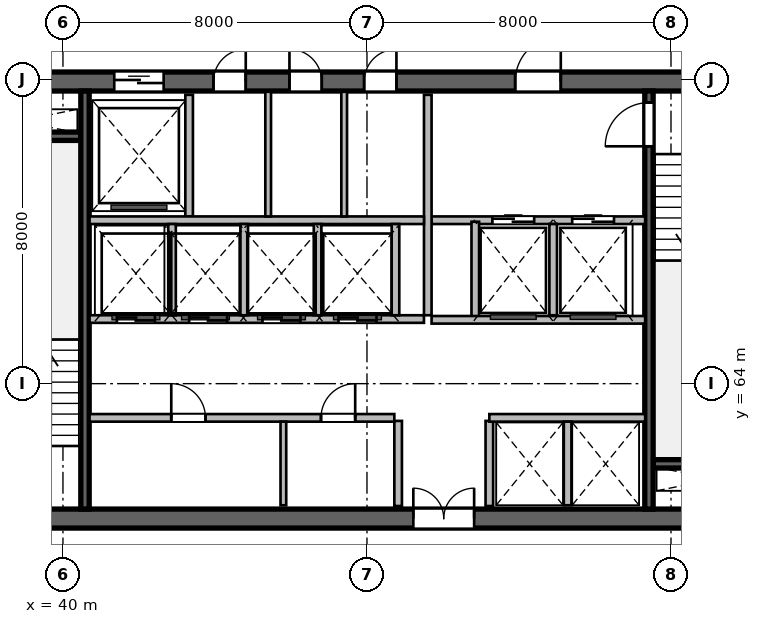
"""IFC4 building model, lengths in metres.
Left out: names, types, materials, properties, quantities, classifications, styles, units other than length and angle.
Written with IfcOpenShell. Run it as: python <this file> out.ifc"""

import sys

from ifc_helpers import new_model, si_unit, direction, frame, frame_2d, origin, place, context, subcontext, project, spatial, rectangle, extrude, source, transform, mapped, element, fill, save


model = new_model("IFC4")
c1 = context("Model", 3, precision=1e-05, world=origin(), true_north=direction((0.0, 1.0)))
c2 = subcontext(c1, "Body", "Model", "MODEL_VIEW")
j1 = project(units=[si_unit("LENGTHUNIT", "METRE"), si_unit("PLANEANGLEUNIT", "RADIAN")], contexts=[c1])
p1 = place(None, origin())
s1 = spatial("IfcSite", under=j1, at=p1, CompositionType="ELEMENT")
p2 = place(p1, origin())
s2 = spatial("IfcBuilding", under=s1, at=p2, CompositionType="ELEMENT")
p3 = place(p2, frame((0.0, 0.0, 174.0)))
s3 = spatial("IfcBuildingStorey", under=s2, at=p3, CompositionType="ELEMENT", Elevation=174.0)
m1 = source(origin(), c2, "Body", "SweptSolid", [
    extrude(rectangle(XDim=21.6, YDim=0.5, at=frame_2d((10.8, 0.0))), origin(), (0.0, 0.0, 1.0), 3.9),
])
p4 = place(p3, frame((37.2, 60.45, 0.0), z_axis=(0.0, 0.0, 1.0), x_axis=(1.0, 0.0, 0.0)))
e1 = element("IfcWall", 1, at=p4, inside=s3, PredefinedType="SHEAR", context=c2, shape_type="MappedRepresentation", body=[
    mapped(m1, transform((0.0, 0.0, 0.0), scale=1.0)),
])
p5 = place(p4, frame((1.1, 0.0, 0.0)))
e2 = element("IfcOpeningElement", 2, at=p5, cuts=e1, PredefinedType="OPENING", context=c2, shape_type="SweptSolid", body=[
    extrude(rectangle(XDim=1.15, YDim=2.15, at=frame_2d((0.575, 1.075))), frame((0.0, 0.26, 0.0), z_axis=(0.0, -1.0, 0.0), x_axis=(1.0, 0.0, 0.0)), (0.0, 0.0, 1.0), 0.52),
])
p6 = place(p4, frame((19.5, 0.0, 0.0)))
e3 = element("IfcOpeningElement", 3, at=p6, cuts=e1, PredefinedType="OPENING", context=c2, shape_type="SweptSolid", body=[
    extrude(rectangle(XDim=0.9, YDim=2.1, at=frame_2d((0.45, 1.05))), frame((0.0, 0.26, 0.0), z_axis=(0.0, -1.0, 0.0), x_axis=(1.0, 0.0, 0.0)), (0.0, 0.0, 1.0), 0.52),
])
p7 = place(p4, frame((12.02, 0.0, 0.0)))
e4 = element("IfcOpeningElement", 4, at=p7, cuts=e1, PredefinedType="OPENING", context=c2, shape_type="SweptSolid", body=[
    extrude(rectangle(XDim=1.6, YDim=2.15, at=frame_2d((0.8, 1.075))), frame((0.0, 0.26, 0.0), z_axis=(0.0, -1.0, 0.0), x_axis=(1.0, 0.0, 0.0)), (0.0, 0.0, 1.0), 0.52),
])
p8 = place(p3, frame((37.2, 71.95, 0.0), z_axis=(0.0, 0.0, 1.0), x_axis=(1.0, 0.0, 0.0)))
e5 = element("IfcWall", 5, at=p8, inside=s3, PredefinedType="SHEAR", context=c2, shape_type="MappedRepresentation", body=[
    mapped(m1, transform((0.0, 0.0, 0.0), scale=1.0)),
])
p9 = place(p8, frame((1.2, 0.0, 0.0)))
e6 = element("IfcOpeningElement", 6, at=p9, cuts=e5, PredefinedType="OPENING", context=c2, shape_type="SweptSolid", body=[
    extrude(rectangle(XDim=0.9, YDim=2.1, at=frame_2d((0.45, 1.05))), frame((0.0, 0.26, 0.0), z_axis=(0.0, -1.0, 0.0), x_axis=(1.0, 0.0, 0.0)), (0.0, 0.0, 1.0), 0.52),
])
p10 = place(p8, frame((14.7, 0.0, 0.0)))
e7 = element("IfcOpeningElement", 7, at=p10, cuts=e5, PredefinedType="OPENING", context=c2, shape_type="SweptSolid", body=[
    extrude(rectangle(XDim=1.2, YDim=2.15, at=frame_2d((0.6, 1.075))), frame((0.0, 0.26, 0.0), z_axis=(0.0, -1.0, 0.0), x_axis=(1.0, 0.0, 0.0)), (0.0, 0.0, 1.0), 0.52),
])
p11 = place(p8, frame((4.15, 0.0, 0.0)))
e8 = element("IfcOpeningElement", 8, at=p11, cuts=e5, PredefinedType="OPENING", context=c2, shape_type="SweptSolid", body=[
    extrude(rectangle(XDim=1.3, YDim=2.15, at=frame_2d((0.65, 1.075))), frame((0.0, 0.26, 0.0), z_axis=(0.0, -1.0, 0.0), x_axis=(1.0, 0.0, 0.0)), (0.0, 0.0, 1.0), 0.52),
])
p12 = place(p8, frame((6.76, 0.0, 0.0)))
e9 = element("IfcOpeningElement", 9, at=p12, cuts=e5, PredefinedType="OPENING", context=c2, shape_type="SweptSolid", body=[
    extrude(rectangle(XDim=0.85, YDim=2.1, at=frame_2d((0.425, 1.05))), frame((0.0, 0.26, 0.0), z_axis=(0.0, -1.0, 0.0), x_axis=(1.0, 0.0, 0.0)), (0.0, 0.0, 1.0), 0.52),
])
p13 = place(p8, frame((8.76, 0.0, 0.0)))
e10 = element("IfcOpeningElement", 10, at=p13, cuts=e5, PredefinedType="OPENING", context=c2, shape_type="SweptSolid", body=[
    extrude(rectangle(XDim=0.85, YDim=2.1, at=frame_2d((0.425, 1.05))), frame((0.0, 0.26, 0.0), z_axis=(0.0, -1.0, 0.0), x_axis=(1.0, 0.0, 0.0)), (0.0, 0.0, 1.0), 0.52),
])
p14 = place(p8, frame((10.725, 0.0, 0.0)))
e11 = element("IfcOpeningElement", 11, at=p14, cuts=e5, PredefinedType="OPENING", context=c2, shape_type="SweptSolid", body=[
    extrude(rectangle(XDim=0.85, YDim=2.1, at=frame_2d((0.425, 1.05))), frame((0.0, 0.26, 0.0), z_axis=(0.0, -1.0, 0.0), x_axis=(1.0, 0.0, 0.0)), (0.0, 0.0, 1.0), 0.52),
])
m2 = source(origin(), c2, "Body", "SweptSolid", [
    extrude(rectangle(XDim=3.27, YDim=0.22, at=frame_2d((1.635, 0.0))), origin(), (0.0, 0.0, 1.0), 3.9),
])
for number, where, z_axis, x_axis in (
    (12, (37.2, 70.51, 0.0), (0.0, 0.0, 1.0), (1.0, 0.0, 0.0)),
    (13, (55.53, 61.89, 0.0), (0.0, 0.0, 1.0), (1.0, 0.0, 0.0)),
):
    element("IfcWall", number, at=place(p3, frame(where, z_axis=z_axis, x_axis=x_axis)), inside=s3, PredefinedType="SHEAR", context=c2, shape_type="MappedRepresentation", body=[
        mapped(m2, transform((0.0, 0.0, 0.0), scale=1.0)),
    ])
m3 = source(origin(), c2, "Body", "SweptSolid", [
    extrude(rectangle(XDim=11.0, YDim=0.22, at=frame_2d((5.5, 0.0))), origin(), (0.0, 0.0, 1.0), 3.9),
])
p15 = place(p3, frame((40.58, 60.7, 0.0), z_axis=(0.0, 0.0, 1.0), x_axis=(0.0, 1.0, 0.0)))
e14 = element("IfcWall", 14, at=p15, inside=s3, PredefinedType="SHEAR", context=c2, shape_type="MappedRepresentation", body=[
    mapped(m3, transform((0.0, 0.0, 0.0), scale=1.0)),
])
p16 = place(p3, frame((55.42, 60.7, 0.0), z_axis=(0.0, 0.0, 1.0), x_axis=(0.0, 1.0, 0.0)))
e15 = element("IfcWall", 15, at=p16, inside=s3, PredefinedType="SHEAR", context=c2, shape_type="MappedRepresentation", body=[
    mapped(m3, transform((0.0, 0.0, 0.0), scale=1.0)),
])
p17 = place(p16, frame((9.545, 0.0, 0.0)))
e16 = element("IfcOpeningElement", 16, at=p17, cuts=e15, PredefinedType="OPENING", context=c2, shape_type="SweptSolid", body=[
    extrude(rectangle(XDim=1.15, YDim=2.15, at=frame_2d((0.575, 1.075))), frame((0.0, 0.12, 0.0), z_axis=(0.0, -1.0, 0.0), x_axis=(1.0, 0.0, 0.0)), (0.0, 0.0, 1.0), 0.24),
])
m4 = source(origin(), c2, "Body", "SweptSolid", [
    extrude(rectangle(XDim=2.24, YDim=0.2, at=frame_2d((1.12, 0.0))), origin(), (0.0, 0.0, 1.0), 3.65),
])
for number, where, z_axis, x_axis in (
    (17, (48.82, 60.78, 0.0), (0.0, 0.0, 1.0), (0.0, 1.0, 0.0)),
    (18, (51.22, 60.78, 0.0), (0.0, 0.0, 1.0), (0.0, 1.0, 0.0)),
):
    element("IfcWall", number, at=place(p3, frame(where, z_axis=z_axis, x_axis=x_axis)), inside=s3, PredefinedType="SOLIDWALL", context=c2, shape_type="MappedRepresentation", body=[
        mapped(m4, transform((0.0, 0.0, 0.0), scale=1.0)),
    ])
m5 = source(origin(), c2, "Body", "SweptSolid", [
    extrude(rectangle(XDim=5.62, YDim=0.2, at=frame_2d((2.81, 0.0))), origin(), (0.0, 0.0, 1.0), 3.65),
])
p18 = place(p3, frame((49.7, 68.3, 0.0), z_axis=(0.0, 0.0, 1.0), x_axis=(1.0, 0.0, 0.0)))
e19 = element("IfcWall", 19, at=p18, inside=s3, PredefinedType="SOLIDWALL", context=c2, shape_type="MappedRepresentation", body=[
    mapped(m5, transform((0.0, 0.0, 0.0), scale=1.0)),
])
p19 = place(p18, frame((1.6, 0.0, 0.0)))
e20 = element("IfcOpeningElement", 20, at=p19, cuts=e19, PredefinedType="OPENING", context=c2, shape_type="SweptSolid", body=[
    extrude(rectangle(XDim=1.1, YDim=2.15, at=frame_2d((0.55, 1.075))), frame((0.0, 0.11, 0.0), z_axis=(0.0, -1.0, 0.0), x_axis=(1.0, 0.0, 0.0)), (0.0, 0.0, 1.0), 0.22),
])
p20 = place(p18, frame((3.7, 0.0, 0.0)))
e21 = element("IfcOpeningElement", 21, at=p20, cuts=e19, PredefinedType="OPENING", context=c2, shape_type="SweptSolid", body=[
    extrude(rectangle(XDim=1.1, YDim=2.15, at=frame_2d((0.55, 1.075))), frame((0.0, 0.11, 0.0), z_axis=(0.0, -1.0, 0.0), x_axis=(1.0, 0.0, 0.0)), (0.0, 0.0, 1.0), 0.22),
])
m6 = source(origin(), c2, "Body", "SweptSolid", [
    extrude(rectangle(XDim=5.8, YDim=0.2, at=frame_2d((2.9, 0.0))), origin(), (0.0, 0.0, 1.0), 3.65),
])
p21 = place(p3, frame((49.6, 65.8, 0.0), z_axis=(0.0, 0.0, 1.0), x_axis=(0.0, 1.0, 0.0)))
e22 = element("IfcWall", 22, at=p21, inside=s3, PredefinedType="SOLIDWALL", context=c2, shape_type="MappedRepresentation", body=[
    mapped(m6, transform((0.0, 0.0, 0.0), scale=1.0)),
])
m7 = source(origin(), c2, "Body", "SweptSolid", [
    extrude(rectangle(XDim=2.58, YDim=0.2, at=frame_2d((1.29, 0.0))), origin(), (0.0, 0.0, 1.0), 3.65),
])
p22 = place(p3, frame((50.85, 65.68, 0.0), z_axis=(0.0, 0.0, 1.0), x_axis=(0.0, 1.0, 0.0)))
e23 = element("IfcWall", 23, at=p22, inside=s3, PredefinedType="SOLIDWALL", context=c2, shape_type="MappedRepresentation", body=[
    mapped(m7, transform((0.0, 0.0, 0.0), scale=1.0)),
])
m8 = source(origin(), c2, "Body", "SweptSolid", [
    extrude(rectangle(XDim=2.4, YDim=0.2, at=frame_2d((1.2, 0.0))), origin(), (0.0, 0.0, 1.0), 3.65),
])
p23 = place(p3, frame((52.9, 65.8, 0.0), z_axis=(0.0, 0.0, 1.0), x_axis=(0.0, 1.0, 0.0)))
e24 = element("IfcWall", 24, at=p23, inside=s3, PredefinedType="SOLIDWALL", context=c2, shape_type="MappedRepresentation", body=[
    mapped(m8, transform((0.0, 0.0, 0.0), scale=1.0)),
])
p24 = place(p3, frame((49.7, 65.68, 0.0), z_axis=(0.0, 0.0, 1.0), x_axis=(1.0, 0.0, 0.0)))
e25 = element("IfcWall", 25, at=p24, inside=s3, PredefinedType="SOLIDWALL", context=c2, shape_type="MappedRepresentation", body=[
    mapped(m5, transform((0.0, 0.0, 0.0), scale=1.0)),
])
m9 = source(origin(), c2, "Body", "SweptSolid", [
    extrude(rectangle(XDim=3.2, YDim=0.2, at=frame_2d((1.6, 0.0))), origin(), (0.0, 0.0, 1.0), 3.65),
])
p25 = place(p3, frame((43.32, 68.4, 0.0), z_axis=(0.0, 0.0, 1.0), x_axis=(0.0, 1.0, 0.0)))
e26 = element("IfcWall", 26, at=p25, inside=s3, PredefinedType="SOLIDWALL", context=c2, shape_type="MappedRepresentation", body=[
    mapped(m9, transform((0.0, 0.0, 0.0), scale=1.0)),
])
m10 = source(origin(), c2, "Body", "SweptSolid", [
    extrude(rectangle(XDim=8.8, YDim=0.2, at=frame_2d((4.4, 0.0))), origin(), (0.0, 0.0, 1.0), 3.65),
])
p26 = place(p3, frame((40.7, 68.3, 0.0), z_axis=(0.0, 0.0, 1.0), x_axis=(1.0, 0.0, 0.0)))
e27 = element("IfcWall", 27, at=p26, inside=s3, PredefinedType="SOLIDWALL", context=c2, shape_type="MappedRepresentation", body=[
    mapped(m10, transform((0.0, 0.0, 0.0), scale=1.0)),
])
m11 = source(origin(), c2, "Body", "SweptSolid", [
    extrude(rectangle(XDim=3.28, YDim=0.15, at=frame_2d((1.64, 0.0))), origin(), (0.0, 0.0, 1.0), 3.65),
])
for number, where, z_axis, x_axis in (
    (28, (45.4, 68.4, 0.0), (0.0, 0.0, 1.0), (0.0, 1.0, 0.0)),
    (29, (47.4, 68.4, 0.0), (0.0, 0.0, 1.0), (0.0, 1.0, 0.0)),
):
    element("IfcWall", number, at=place(p3, frame(where, z_axis=z_axis, x_axis=x_axis)), inside=s3, PredefinedType="PARTITIONING", context=c2, shape_type="MappedRepresentation", body=[
        mapped(m11, transform((0.0, 0.0, 0.0), scale=1.0)),
    ])
m12 = source(origin(), c2, "Body", "SweptSolid", [
    extrude(rectangle(XDim=8.02, YDim=0.2, at=frame_2d((4.01, 0.0))), origin(), (0.0, 0.0, 1.0), 3.65),
])
p27 = place(p3, frame((40.7, 63.1, 0.0), z_axis=(0.0, 0.0, 1.0), x_axis=(1.0, 0.0, 0.0)))
e30 = element("IfcWall", 30, at=p27, inside=s3, PredefinedType="SOLIDWALL", context=c2, shape_type="MappedRepresentation", body=[
    mapped(m12, transform((0.0, 0.0, 0.0), scale=1.0)),
])
p28 = place(p27, frame((2.15, 0.0, 0.0)))
e31 = element("IfcOpeningElement", 31, at=p28, cuts=e30, PredefinedType="OPENING", context=c2, shape_type="SweptSolid", body=[
    extrude(rectangle(XDim=0.9, YDim=2.1, at=frame_2d((0.45, 1.05))), frame((0.0, 0.11, 0.0), z_axis=(0.0, -1.0, 0.0), x_axis=(1.0, 0.0, 0.0)), (0.0, 0.0, 1.0), 0.22),
])
p29 = place(p27, frame((6.09, 0.0, 0.0)))
e32 = element("IfcOpeningElement", 32, at=p29, cuts=e30, PredefinedType="OPENING", context=c2, shape_type="SweptSolid", body=[
    extrude(rectangle(XDim=0.9, YDim=2.1, at=frame_2d((0.45, 1.05))), frame((0.0, 0.11, 0.0), z_axis=(0.0, -1.0, 0.0), x_axis=(1.0, 0.0, 0.0)), (0.0, 0.0, 1.0), 0.22),
])
m13 = source(origin(), c2, "Body", "SweptSolid", [
    extrude(rectangle(XDim=4.1, YDim=0.2, at=frame_2d((2.05, 0.0))), origin(), (0.0, 0.0, 1.0), 3.65),
])
p30 = place(p3, frame((51.22, 63.1, 0.0), z_axis=(0.0, 0.0, 1.0), x_axis=(1.0, 0.0, 0.0)))
e33 = element("IfcWall", 33, at=p30, inside=s3, PredefinedType="SOLIDWALL", context=c2, shape_type="MappedRepresentation", body=[
    mapped(m13, transform((0.0, 0.0, 0.0), scale=1.0)),
])
m14 = source(origin(), c2, "Body", "SweptSolid", [
    extrude(rectangle(XDim=2.2, YDim=0.15, at=frame_2d((1.1, 0.0))), origin(), (0.0, 0.0, 1.0), 3.65),
])
p31 = place(p3, frame((45.8, 60.8, 0.0), z_axis=(0.0, 0.0, 1.0), x_axis=(0.0, 1.0, 0.0)))
e34 = element("IfcWall", 34, at=p31, inside=s3, PredefinedType="PARTITIONING", context=c2, shape_type="MappedRepresentation", body=[
    mapped(m14, transform((0.0, 0.0, 0.0), scale=1.0)),
])
m15 = source(origin(), c2, "Body", "SweptSolid", [
    extrude(rectangle(XDim=2.2, YDim=0.2, at=frame_2d((1.1, 0.0))), origin(), (0.0, 0.0, 1.0), 3.65),
])
p32 = place(p3, frame((53.28, 60.8, 0.0), z_axis=(0.0, 0.0, 1.0), x_axis=(0.0, 1.0, 0.0)))
e35 = element("IfcWall", 35, at=p32, inside=s3, PredefinedType="SOLIDWALL", context=c2, shape_type="MappedRepresentation", body=[
    mapped(m15, transform((0.0, 0.0, 0.0), scale=1.0)),
])
p33 = place(p3, frame((40.7, 65.7, 0.0), z_axis=(0.0, 0.0, 1.0), x_axis=(1.0, 0.0, 0.0)))
e36 = element("IfcWall", 36, at=p33, inside=s3, PredefinedType="SOLIDWALL", context=c2, shape_type="MappedRepresentation", body=[
    mapped(m10, transform((0.0, 0.0, 0.0), scale=1.0)),
])
p34 = place(p33, frame((0.72, 0.0, 0.0)))
e37 = element("IfcOpeningElement", 37, at=p34, cuts=e36, PredefinedType="OPENING", context=c2, shape_type="SweptSolid", body=[
    extrude(rectangle(XDim=1.0, YDim=2.15, at=frame_2d((0.5, 1.075))), frame((0.0, 0.11, 0.0), z_axis=(0.0, -1.0, 0.0), x_axis=(1.0, 0.0, 0.0)), (0.0, 0.0, 1.0), 0.22),
])
p35 = place(p33, frame((2.62, 0.0, 0.0)))
e38 = element("IfcOpeningElement", 38, at=p35, cuts=e36, PredefinedType="OPENING", context=c2, shape_type="SweptSolid", body=[
    extrude(rectangle(XDim=1.0, YDim=2.15, at=frame_2d((0.5, 1.075))), frame((0.0, 0.11, 0.0), z_axis=(0.0, -1.0, 0.0), x_axis=(1.0, 0.0, 0.0)), (0.0, 0.0, 1.0), 0.22),
])
p36 = place(p33, frame((4.55, 0.0, 0.0)))
e39 = element("IfcOpeningElement", 39, at=p36, cuts=e36, PredefinedType="OPENING", context=c2, shape_type="SweptSolid", body=[
    extrude(rectangle(XDim=1.0, YDim=2.15, at=frame_2d((0.5, 1.075))), frame((0.0, 0.11, 0.0), z_axis=(0.0, -1.0, 0.0), x_axis=(1.0, 0.0, 0.0)), (0.0, 0.0, 1.0), 0.22),
])
p37 = place(p33, frame((6.55, 0.0, 0.0)))
e40 = element("IfcOpeningElement", 40, at=p37, cuts=e36, PredefinedType="OPENING", context=c2, shape_type="SweptSolid", body=[
    extrude(rectangle(XDim=1.0, YDim=2.15, at=frame_2d((0.5, 1.075))), frame((0.0, 0.11, 0.0), z_axis=(0.0, -1.0, 0.0), x_axis=(1.0, 0.0, 0.0)), (0.0, 0.0, 1.0), 0.22),
])
for number, where, z_axis, x_axis in (
    (41, (48.75, 65.8, 0.0), (0.0, 0.0, 1.0), (0.0, 1.0, 0.0)),
    (42, (42.87, 65.8, 0.0), (0.0, 0.0, 1.0), (0.0, 1.0, 0.0)),
    (43, (44.77, 65.8, 0.0), (0.0, 0.0, 1.0), (0.0, 1.0, 0.0)),
    (44, (46.7, 65.8, 0.0), (0.0, 0.0, 1.0), (0.0, 1.0, 0.0)),
):
    element("IfcWall", number, at=place(p3, frame(where, z_axis=z_axis, x_axis=x_axis)), inside=s3, PredefinedType="SOLIDWALL", context=c2, shape_type="MappedRepresentation", body=[
        mapped(m8, transform((0.0, 0.0, 0.0), scale=1.0)),
    ])
m16 = source(origin(), c2, "Body", "SweptSolid", [
    extrude(rectangle(XDim=1.15, YDim=2.15, at=frame_2d((0.575, 1.075))), frame((0.0, 0.025, 0.0), z_axis=(0.0, -1.0, 0.0), x_axis=(1.0, 0.0, 0.0)), (0.0, 0.0, 1.0), 0.05),
])
p38 = place(p17, origin())
e45 = element("IfcDoor", 45, at=p38, inside=s3, OperationType="SINGLE_SWING_LEFT", PredefinedType="DOOR", context=c2, shape_type="MappedRepresentation", body=[
    mapped(m16, transform((0.0, 0.0, 0.0), scale=1.0)),
])
fill(e16, e45)
m17 = source(origin(), c2, "Body", "SweptSolid", [
    extrude(rectangle(XDim=1.6, YDim=2.15, at=frame_2d((0.8, 1.075))), frame((0.0, 0.025, 0.0), z_axis=(0.0, -1.0, 0.0), x_axis=(1.0, 0.0, 0.0)), (0.0, 0.0, 1.0), 0.05),
])
p39 = place(p7, origin())
e46 = element("IfcDoor", 46, at=p39, inside=s3, OperationType="DOUBLE_DOOR_SINGLE_SWING", PredefinedType="DOOR", context=c2, shape_type="MappedRepresentation", body=[
    mapped(m17, transform((0.0, 0.0, 0.0), scale=1.0)),
])
fill(e4, e46)
m18 = source(origin(), c2, "Body", "SweptSolid", [
    extrude(rectangle(XDim=1.2, YDim=2.15, at=frame_2d((0.6, 1.075))), frame((0.0, 0.025, 0.0), z_axis=(0.0, -1.0, 0.0), x_axis=(1.0, 0.0, 0.0)), (0.0, 0.0, 1.0), 0.05),
])
p40 = place(p10, origin())
e47 = element("IfcDoor", 47, at=p40, inside=s3, OperationType="SINGLE_SWING_RIGHT", PredefinedType="DOOR", context=c2, shape_type="MappedRepresentation", body=[
    mapped(m18, transform((0.0, 0.0, 0.0), scale=1.0)),
])
fill(e7, e47)
m19 = source(origin(), c2, "Body", "SweptSolid", [
    extrude(rectangle(XDim=1.1, YDim=2.15, at=frame_2d((0.55, 1.075))), frame((0.0, 0.025, 0.0), z_axis=(0.0, -1.0, 0.0), x_axis=(1.0, 0.0, 0.0)), (0.0, 0.0, 1.0), 0.05),
])
p41 = place(p19, origin())
e48 = element("IfcDoor", 48, at=p41, inside=s3, OperationType="DOUBLE_DOOR_SLIDING", PredefinedType="DOOR", context=c2, shape_type="MappedRepresentation", body=[
    mapped(m19, transform((0.0, 0.0, 0.0), scale=1.0)),
])
fill(e20, e48)
p42 = place(p20, origin())
e49 = element("IfcDoor", 49, at=p42, inside=s3, OperationType="DOUBLE_DOOR_SLIDING", PredefinedType="DOOR", context=c2, shape_type="MappedRepresentation", body=[
    mapped(m19, transform((0.0, 0.0, 0.0), scale=1.0)),
])
fill(e21, e49)
m20 = source(origin(), c2, "Body", "SweptSolid", [
    extrude(rectangle(XDim=1.3, YDim=2.15, at=frame_2d((0.65, 1.075))), frame((0.0, 0.025, 0.0), z_axis=(0.0, -1.0, 0.0), x_axis=(1.0, 0.0, 0.0)), (0.0, 0.0, 1.0), 0.05),
])
p43 = place(p11, origin())
e50 = element("IfcDoor", 50, at=p43, inside=s3, OperationType="DOUBLE_DOOR_SLIDING", PredefinedType="DOOR", context=c2, shape_type="MappedRepresentation", body=[
    mapped(m20, transform((0.0, 0.0, 0.0), scale=1.0)),
])
fill(e8, e50)
m21 = source(origin(), c2, "Body", "SweptSolid", [
    extrude(rectangle(XDim=0.85, YDim=2.1, at=frame_2d((0.425, 1.05))), frame((0.0, 0.025, 0.0), z_axis=(0.0, -1.0, 0.0), x_axis=(1.0, 0.0, 0.0)), (0.0, 0.0, 1.0), 0.05),
])
p44 = place(p12, origin())
e51 = element("IfcDoor", 51, at=p44, inside=s3, OperationType="SINGLE_SWING_RIGHT", PredefinedType="DOOR", context=c2, shape_type="MappedRepresentation", body=[
    mapped(m21, transform((0.0, 0.0, 0.0), scale=1.0)),
])
fill(e9, e51)
p45 = place(p13, origin())
e52 = element("IfcDoor", 52, at=p45, inside=s3, OperationType="SINGLE_SWING_LEFT", PredefinedType="DOOR", context=c2, shape_type="MappedRepresentation", body=[
    mapped(m21, transform((0.0, 0.0, 0.0), scale=1.0)),
])
fill(e10, e52)
p46 = place(p14, origin())
e53 = element("IfcDoor", 53, at=p46, inside=s3, OperationType="SINGLE_SWING_RIGHT", PredefinedType="DOOR", context=c2, shape_type="MappedRepresentation", body=[
    mapped(m21, transform((0.0, 0.0, 0.0), scale=1.0)),
])
fill(e11, e53)
m22 = source(origin(), c2, "Body", "SweptSolid", [
    extrude(rectangle(XDim=0.9, YDim=2.1, at=frame_2d((0.45, 1.05))), frame((0.0, 0.025, 0.0), z_axis=(0.0, -1.0, 0.0), x_axis=(1.0, 0.0, 0.0)), (0.0, 0.0, 1.0), 0.05),
])
p47 = place(p28, origin())
e54 = element("IfcDoor", 54, at=p47, inside=s3, OperationType="SINGLE_SWING_LEFT", PredefinedType="DOOR", context=c2, shape_type="MappedRepresentation", body=[
    mapped(m22, transform((0.0, 0.0, 0.0), scale=1.0)),
])
fill(e31, e54)
p48 = place(p29, origin())
e55 = element("IfcDoor", 55, at=p48, inside=s3, OperationType="SINGLE_SWING_RIGHT", PredefinedType="DOOR", context=c2, shape_type="MappedRepresentation", body=[
    mapped(m22, transform((0.0, 0.0, 0.0), scale=1.0)),
])
fill(e32, e55)
m23 = source(origin(), c2, "Body", "SweptSolid", [
    extrude(rectangle(XDim=1.0, YDim=2.15, at=frame_2d((0.5, 1.075))), frame((0.0, 0.025, 0.0), z_axis=(0.0, -1.0, 0.0), x_axis=(1.0, 0.0, 0.0)), (0.0, 0.0, 1.0), 0.05),
])
p49 = place(p34, origin())
e56 = element("IfcDoor", 56, at=p49, inside=s3, OperationType="DOUBLE_DOOR_SLIDING", PredefinedType="DOOR", context=c2, shape_type="MappedRepresentation", body=[
    mapped(m23, transform((0.0, 0.0, 0.0), scale=1.0)),
])
fill(e37, e56)
p50 = place(p35, origin())
e57 = element("IfcDoor", 57, at=p50, inside=s3, OperationType="DOUBLE_DOOR_SLIDING", PredefinedType="DOOR", context=c2, shape_type="MappedRepresentation", body=[
    mapped(m23, transform((0.0, 0.0, 0.0), scale=1.0)),
])
fill(e38, e57)
p51 = place(p36, origin())
e58 = element("IfcDoor", 58, at=p51, inside=s3, OperationType="DOUBLE_DOOR_SLIDING", PredefinedType="DOOR", context=c2, shape_type="MappedRepresentation", body=[
    mapped(m23, transform((0.0, 0.0, 0.0), scale=1.0)),
])
fill(e39, e58)
p52 = place(p37, origin())
e59 = element("IfcDoor", 59, at=p52, inside=s3, OperationType="DOUBLE_DOOR_SLIDING", PredefinedType="DOOR", context=c2, shape_type="MappedRepresentation", body=[
    mapped(m23, transform((0.0, 0.0, 0.0), scale=1.0)),
])
fill(e40, e59)
save(model, sys.argv[1])
